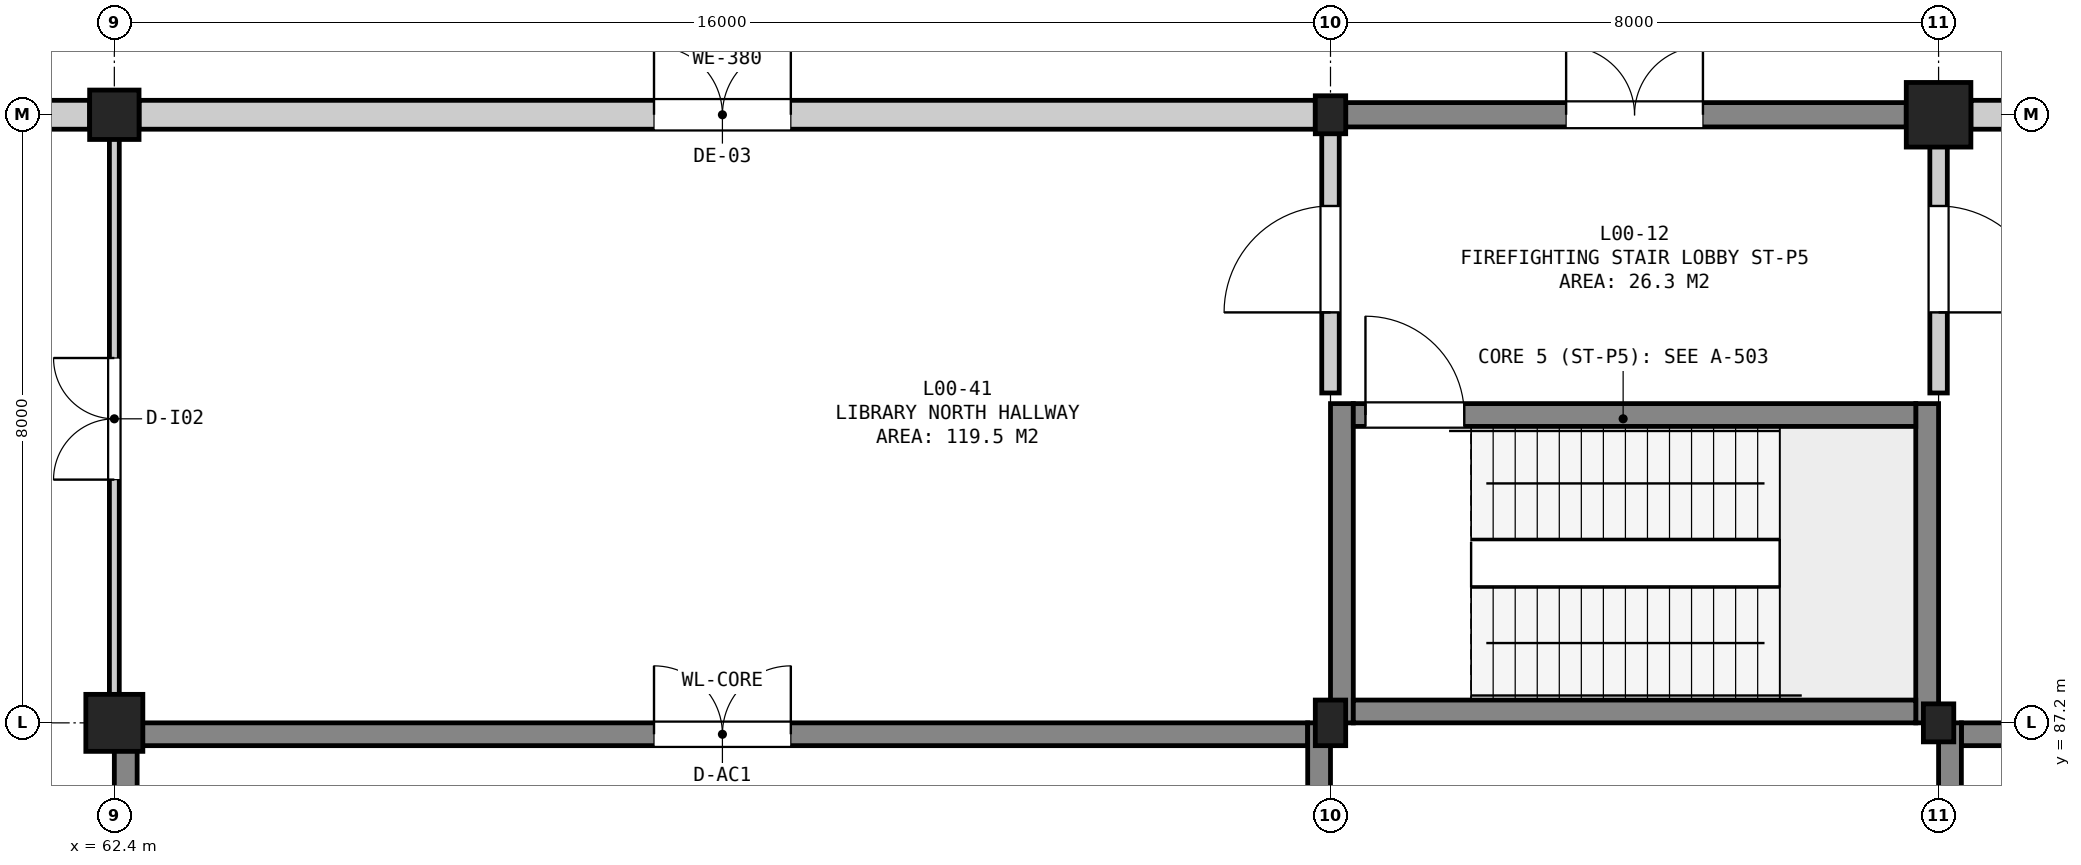
"""IFC4 building model, lengths in metres.
Left out: names, types, materials, properties, quantities, classifications, styles, units other than length and angle.
Written with IfcOpenShell. Run it as: python <this file> out.ifc"""

import sys

from ifc_helpers import new_model, si_unit, direction, frame, frame_2d, origin, origin_2d, place, context, subcontext, project, spatial, rectangle, extrude, element, fill, save


model = new_model("IFC4")
c1 = context("Model", 3, precision=1e-05, world=origin(), true_north=direction((0.0, 1.0)))
c2 = subcontext(c1, "Body", "Model", "MODEL_VIEW")
j1 = project(units=[si_unit("LENGTHUNIT", "METRE"), si_unit("PLANEANGLEUNIT", "RADIAN")], contexts=[c1])
p1 = place(None, origin())
s1 = spatial("IfcSite", under=j1, at=p1, CompositionType="ELEMENT")
p2 = place(p1, origin())
s2 = spatial("IfcBuilding", under=s1, at=p2, CompositionType="ELEMENT")
p3 = place(p2, origin())
s3 = spatial("IfcBuildingStorey", under=s2, at=p3, CompositionType="ELEMENT", Elevation=0.0)
p4 = place(p3, frame((62.4, 87.2, 0.0), z_axis=(0.0, 0.0, 1.0), x_axis=(1.0, 0.0, 0.0)))
e1 = element("IfcColumn", 1, at=p4, inside=s3, PredefinedType="COLUMN", context=c2, shape_type="SweptSolid", body=[
    extrude(rectangle(XDim=0.75, YDim=0.75, at=origin_2d()), origin(), (0.0, 0.0, 1.0), 5.4),
])
p5 = place(p3, frame((62.4, 95.2, 0.0), z_axis=(0.0, 0.0, 1.0), x_axis=(1.0, 0.0, 0.0)))
e2 = element("IfcColumn", 2, at=p5, inside=s3, PredefinedType="COLUMN", context=c2, shape_type="SweptSolid", body=[
    extrude(rectangle(XDim=0.65, YDim=0.65, at=origin_2d()), origin(), (0.0, 0.0, 1.0), 5.4),
])
p6 = place(p3, frame((78.4, 87.2, 0.0), z_axis=(0.0, 0.0, 1.0), x_axis=(1.0, 0.0, 0.0)))
e3 = element("IfcColumn", 3, at=p6, inside=s3, PredefinedType="COLUMN", context=c2, shape_type="SweptSolid", body=[
    extrude(rectangle(XDim=0.4, YDim=0.6, at=origin_2d()), origin(), (0.0, 0.0, 1.0), 5.4),
])
for number, where, z_axis, x_axis in (
    (4, (78.4, 95.2, 0.0), (0.0, 0.0, 1.0), (1.0, 0.0, 0.0)),
    (5, (86.4, 87.2, 0.0), (0.0, 0.0, 1.0), (1.0, 0.0, 0.0)),
):
    element("IfcColumn", number, at=place(p3, frame(where, z_axis=z_axis, x_axis=x_axis)), inside=s3, PredefinedType="COLUMN", context=c2, shape_type="SweptSolid", body=[
        extrude(rectangle(XDim=0.4, YDim=0.5, at=origin_2d()), origin(), (0.0, 0.0, 1.0), 5.4),
    ])
p7 = place(p3, frame((86.4, 95.2, 0.0), z_axis=(0.0, 0.0, 1.0), x_axis=(1.0, 0.0, 0.0)))
e6 = element("IfcColumn", 6, at=p7, inside=s3, PredefinedType="COLUMN", context=c2, shape_type="SweptSolid", body=[
    extrude(rectangle(XDim=0.85, YDim=0.85, at=origin_2d()), origin(), (0.0, 0.0, 1.0), 5.4),
])
p8 = place(p3, frame((102.025, 95.2, 0.0), z_axis=(0.0, 0.0, 1.0), x_axis=(-1.0, 0.0, 0.0)))
e7 = element("IfcWall", 7, at=p8, inside=s3, PredefinedType="SOLIDWALL", context=c2, shape_type="SweptSolid", body=[
    extrude(rectangle(XDim=15.2, YDim=0.38, at=frame_2d((7.6, 0.0))), origin(), (0.0, 0.0, 1.0), 4.065),
])
p9 = place(p8, frame((6.725, 0.0, 0.0)))
e8 = element("IfcOpeningElement", 8, at=p9, cuts=e7, PredefinedType="OPENING", context=c2, shape_type="SweptSolid", body=[
    extrude(rectangle(XDim=1.8, YDim=2.25, at=frame_2d((0.9, 1.125))), frame((0.0, 0.202, 0.0), z_axis=(0.0, -1.0, 0.0), x_axis=(1.0, 0.0, 0.0)), (0.0, 0.0, 1.0), 0.404),
])
p10 = place(p3, frame((85.975, 95.2, 0.0), z_axis=(0.0, 0.0, 1.0), x_axis=(-1.0, 0.0, 0.0)))
e9 = element("IfcWall", 9, at=p10, inside=s3, PredefinedType="SOLIDWALL", context=c2, shape_type="SweptSolid", body=[
    extrude(rectangle(XDim=7.375, YDim=0.32, at=frame_2d((3.688, 0.0))), origin(), (0.0, 0.0, 1.0), 4.515),
])
p11 = place(p10, frame((2.675, 0.0, 0.0)))
e10 = element("IfcOpeningElement", 10, at=p11, cuts=e9, PredefinedType="OPENING", context=c2, shape_type="SweptSolid", body=[
    extrude(rectangle(XDim=1.8, YDim=2.25, at=frame_2d((0.9, 1.125))), frame((0.0, 0.172, 0.0), z_axis=(0.0, -1.0, 0.0), x_axis=(1.0, 0.0, 0.0)), (0.0, 0.0, 1.0), 0.344),
])
p12 = place(p3, frame((78.2, 95.2, 0.0), z_axis=(0.0, 0.0, 1.0), x_axis=(-1.0, 0.0, 0.0)))
e11 = element("IfcWall", 11, at=p12, inside=s3, PredefinedType="SOLIDWALL", context=c2, shape_type="SweptSolid", body=[
    extrude(rectangle(XDim=15.475, YDim=0.38, at=frame_2d((7.737, 0.0))), origin(), (0.0, 0.0, 1.0), 4.015),
])
p13 = place(p12, frame((6.9, 0.0, 0.0)))
e12 = element("IfcOpeningElement", 12, at=p13, cuts=e11, PredefinedType="OPENING", context=c2, shape_type="SweptSolid", body=[
    extrude(rectangle(XDim=1.8, YDim=2.25, at=frame_2d((0.9, 1.125))), frame((0.0, 0.202, 0.0), z_axis=(0.0, -1.0, 0.0), x_axis=(1.0, 0.0, 0.0)), (0.0, 0.0, 1.0), 0.404),
])
p14 = place(p3, frame((62.075, 95.2, 0.0), z_axis=(0.0, 0.0, 1.0), x_axis=(-1.0, 0.0, 0.0)))
e13 = element("IfcWall", 13, at=p14, inside=s3, PredefinedType="SOLIDWALL", context=c2, shape_type="SweptSolid", body=[
    extrude(rectangle(XDim=7.3, YDim=0.38, at=frame_2d((3.65, 0.0))), origin(), (0.0, 0.0, 1.0), 4.48),
])
p15 = place(p14, frame((2.75, 0.0, 0.9)))
e14 = element("IfcOpeningElement", 14, at=p15, cuts=e13, PredefinedType="OPENING", context=c2, shape_type="SweptSolid", body=[
    extrude(rectangle(XDim=1.8, YDim=2.1, at=frame_2d((0.9, 1.05))), frame((0.0, 0.202, 0.0), z_axis=(0.0, -1.0, 0.0), x_axis=(1.0, 0.0, 0.0)), (0.0, 0.0, 1.0), 0.404),
])
p16 = place(p3, frame((62.7, 87.05, 0.0), z_axis=(0.0, 0.0, 1.0), x_axis=(1.0, 0.0, 0.0)))
e15 = element("IfcWall", 15, at=p16, inside=s3, PredefinedType="SHEAR", context=c2, shape_type="SweptSolid", body=[
    extrude(rectangle(XDim=15.4, YDim=0.3, at=frame_2d((7.7, 0.0))), origin(), (0.0, 0.0, 1.0), 5.08),
])
p17 = place(p16, frame((6.8, 0.0, 0.0)))
e16 = element("IfcOpeningElement", 16, at=p17, cuts=e15, PredefinedType="OPENING", context=c2, shape_type="SweptSolid", body=[
    extrude(rectangle(XDim=1.8, YDim=2.3, at=frame_2d((0.9, 1.15))), frame((0.0, 0.162, 0.0), z_axis=(0.0, -1.0, 0.0), x_axis=(1.0, 0.0, 0.0)), (0.0, 0.0, 1.0), 0.324),
])
for number, where, z_axis, x_axis in (
    (17, (62.55, 72.0, 0.0), (0.0, 0.0, 1.0), (0.0, 1.0, 0.0)),
    (18, (78.25, 72.0, 0.0), (0.0, 0.0, 1.0), (0.0, 1.0, 0.0)),
):
    element("IfcWall", number, at=place(p3, frame(where, z_axis=z_axis, x_axis=x_axis)), inside=s3, PredefinedType="SHEAR", context=c2, shape_type="SweptSolid", body=[
        extrude(rectangle(XDim=15.2, YDim=0.3, at=frame_2d((7.6, 0.0))), origin(), (0.0, 0.0, 1.0), 5.08),
    ])
p18 = place(p3, frame((86.7, 87.05, 0.0), z_axis=(0.0, 0.0, 1.0), x_axis=(1.0, 0.0, 0.0)))
e19 = element("IfcWall", 19, at=p18, inside=s3, PredefinedType="SHEAR", context=c2, shape_type="SweptSolid", body=[
    extrude(rectangle(XDim=15.4, YDim=0.3, at=frame_2d((7.7, 0.0))), origin(), (0.0, 0.0, 1.0), 5.08),
])
p19 = place(p3, frame((86.55, 72.0, 0.0), z_axis=(0.0, 0.0, 1.0), x_axis=(0.0, 1.0, 0.0)))
e20 = element("IfcWall", 20, at=p19, inside=s3, PredefinedType="SHEAR", context=c2, shape_type="SweptSolid", body=[
    extrude(rectangle(XDim=15.2, YDim=0.3, at=frame_2d((7.6, 0.0))), origin(), (0.0, 0.0, 1.0), 5.08),
])
for number, where, z_axis, x_axis in (
    (21, (78.55, 87.2, 0.0), (0.0, 0.0, 1.0), (0.0, 1.0, 0.0)),
    (22, (86.25, 87.2, 0.0), (0.0, 0.0, 1.0), (0.0, 1.0, 0.0)),
):
    element("IfcWall", number, at=place(p3, frame(where, z_axis=z_axis, x_axis=x_axis)), inside=s3, PredefinedType="SHEAR", context=c2, shape_type="SweptSolid", body=[
        extrude(rectangle(XDim=4.2, YDim=0.3, at=frame_2d((2.1, 0.0))), origin(), (0.0, 0.0, 1.0), 5.08),
    ])
p20 = place(p3, frame((78.7, 87.35, 0.0), z_axis=(0.0, 0.0, 1.0), x_axis=(1.0, 0.0, 0.0)))
e23 = element("IfcWall", 23, at=p20, inside=s3, PredefinedType="SHEAR", context=c2, shape_type="SweptSolid", body=[
    extrude(rectangle(XDim=7.4, YDim=0.3, at=frame_2d((3.7, 0.0))), origin(), (0.0, 0.0, 1.0), 5.08),
])
p21 = place(p3, frame((78.7, 91.25, 0.0), z_axis=(0.0, 0.0, 1.0), x_axis=(1.0, 0.0, 0.0)))
e24 = element("IfcWall", 24, at=p21, inside=s3, PredefinedType="SHEAR", context=c2, shape_type="SweptSolid", body=[
    extrude(rectangle(XDim=7.4, YDim=0.3, at=frame_2d((3.7, 0.0))), origin(), (0.0, 0.0, 1.0), 5.08),
])
p22 = place(p21, frame((0.16, 0.0, 0.0)))
e25 = element("IfcOpeningElement", 25, at=p22, cuts=e24, PredefinedType="OPENING", context=c2, shape_type="SweptSolid", body=[
    extrude(rectangle(XDim=1.3, YDim=2.18, at=frame_2d((0.65, 1.09))), frame((0.0, 0.162, 0.0), z_axis=(0.0, -1.0, 0.0), x_axis=(1.0, 0.0, 0.0)), (0.0, 0.0, 1.0), 0.324),
])
p23 = place(p3, frame((78.4, 91.54, 0.0), z_axis=(0.0, 0.0, 1.0), x_axis=(0.0, 1.0, 0.0)))
e26 = element("IfcWall", 26, at=p23, inside=s3, PredefinedType="SOLIDWALL", context=c2, shape_type="SweptSolid", body=[
    extrude(rectangle(XDim=3.455, YDim=0.23, at=frame_2d((1.728, 0.0))), origin(), (0.0, 0.0, 1.0), 4.425),
])
p24 = place(p23, frame((1.06, 0.0, 0.0)))
e27 = element("IfcOpeningElement", 27, at=p24, cuts=e26, PredefinedType="OPENING", context=c2, shape_type="SweptSolid", body=[
    extrude(rectangle(XDim=1.4, YDim=2.2, at=frame_2d((0.7, 1.1))), frame((0.0, 0.127, 0.0), z_axis=(0.0, -1.0, 0.0), x_axis=(1.0, 0.0, 0.0)), (0.0, 0.0, 1.0), 0.254),
])
p25 = place(p3, frame((86.4, 91.54, 0.0), z_axis=(0.0, 0.0, 1.0), x_axis=(0.0, 1.0, 0.0)))
e28 = element("IfcWall", 28, at=p25, inside=s3, PredefinedType="SOLIDWALL", context=c2, shape_type="SweptSolid", body=[
    extrude(rectangle(XDim=3.555, YDim=0.23, at=frame_2d((1.777, 0.0))), origin(), (0.0, 0.0, 1.0), 4.225),
])
p26 = place(p25, frame((1.06, 0.0, 0.0)))
e29 = element("IfcOpeningElement", 29, at=p26, cuts=e28, PredefinedType="OPENING", context=c2, shape_type="SweptSolid", body=[
    extrude(rectangle(XDim=1.4, YDim=2.2, at=frame_2d((0.7, 1.1))), frame((0.0, 0.127, 0.0), z_axis=(0.0, -1.0, 0.0), x_axis=(1.0, 0.0, 0.0)), (0.0, 0.0, 1.0), 0.254),
])
p27 = place(p3, frame((62.4, 87.34, 0.0), z_axis=(0.0, 0.0, 1.0), x_axis=(0.0, 1.0, 0.0)))
e30 = element("IfcWall", 30, at=p27, inside=s3, PredefinedType="PARTITIONING", context=c2, shape_type="SweptSolid", body=[
    extrude(rectangle(XDim=7.655, YDim=0.13, at=frame_2d((3.828, 0.0))), origin(), (0.0, 0.0, 1.0), 4.575),
])
p28 = place(p27, frame((3.06, 0.0, 0.0)))
e31 = element("IfcOpeningElement", 31, at=p28, cuts=e30, PredefinedType="OPENING", context=c2, shape_type="SweptSolid", body=[
    extrude(rectangle(XDim=1.6, YDim=2.2, at=frame_2d((0.8, 1.1))), frame((0.0, 0.077, 0.0), z_axis=(0.0, -1.0, 0.0), x_axis=(1.0, 0.0, 0.0)), (0.0, 0.0, 1.0), 0.154),
])
p29 = place(p11, frame((1.8, 0.0, 0.0), z_axis=(0.0, 0.0, 1.0), x_axis=(-1.0, 0.0, 0.0)))
e32 = element("IfcDoor", 32, at=p29, inside=s3, OperationType="DOUBLE_DOOR_SINGLE_SWING", PredefinedType="DOOR", context=c2, shape_type="SweptSolid", body=[
    extrude(rectangle(XDim=1.8, YDim=2.25, at=frame_2d((0.9, 1.125))), frame((0.0, 0.025, 0.0), z_axis=(0.0, -1.0, 0.0), x_axis=(1.0, 0.0, 0.0)), (0.0, 0.0, 1.0), 0.05),
])
fill(e10, e32)
p30 = place(p13, frame((1.8, 0.0, 0.0), z_axis=(0.0, 0.0, 1.0), x_axis=(-1.0, 0.0, 0.0)))
e33 = element("IfcDoor", 33, at=p30, inside=s3, OperationType="DOUBLE_DOOR_SINGLE_SWING", PredefinedType="DOOR", context=c2, shape_type="SweptSolid", body=[
    extrude(rectangle(XDim=1.8, YDim=2.25, at=frame_2d((0.9, 1.125))), frame((0.0, 0.025, 0.0), z_axis=(0.0, -1.0, 0.0), x_axis=(1.0, 0.0, 0.0)), (0.0, 0.0, 1.0), 0.05),
])
fill(e12, e33)
p31 = place(p17, origin())
e34 = element("IfcDoor", 34, at=p31, inside=s3, OperationType="DOUBLE_DOOR_SINGLE_SWING", PredefinedType="DOOR", context=c2, shape_type="SweptSolid", body=[
    extrude(rectangle(XDim=1.8, YDim=2.3, at=frame_2d((0.9, 1.15))), frame((0.0, 0.025, 0.0), z_axis=(0.0, -1.0, 0.0), x_axis=(1.0, 0.0, 0.0)), (0.0, 0.0, 1.0), 0.05),
])
fill(e16, e34)
p32 = place(p22, origin())
e35 = element("IfcDoor", 35, at=p32, inside=s3, OperationType="SINGLE_SWING_LEFT", PredefinedType="DOOR", context=c2, shape_type="SweptSolid", body=[
    extrude(rectangle(XDim=1.3, YDim=2.18, at=frame_2d((0.65, 1.09))), frame((0.0, 0.025, 0.0), z_axis=(0.0, -1.0, 0.0), x_axis=(1.0, 0.0, 0.0)), (0.0, 0.0, 1.0), 0.05),
])
fill(e25, e35)
p33 = place(p24, origin())
e36 = element("IfcDoor", 36, at=p33, inside=s3, OperationType="SINGLE_SWING_LEFT", PredefinedType="DOOR", context=c2, shape_type="SweptSolid", body=[
    extrude(rectangle(XDim=1.4, YDim=2.2, at=frame_2d((0.7, 1.1))), frame((0.0, 0.025, 0.0), z_axis=(0.0, -1.0, 0.0), x_axis=(1.0, 0.0, 0.0)), (0.0, 0.0, 1.0), 0.05),
])
fill(e27, e36)
p34 = place(p26, frame((1.4, 0.0, 0.0), z_axis=(0.0, 0.0, 1.0), x_axis=(-1.0, 0.0, 0.0)))
e37 = element("IfcDoor", 37, at=p34, inside=s3, OperationType="SINGLE_SWING_RIGHT", PredefinedType="DOOR", context=c2, shape_type="SweptSolid", body=[
    extrude(rectangle(XDim=1.4, YDim=2.2, at=frame_2d((0.7, 1.1))), frame((0.0, 0.025, 0.0), z_axis=(0.0, -1.0, 0.0), x_axis=(1.0, 0.0, 0.0)), (0.0, 0.0, 1.0), 0.05),
])
fill(e29, e37)
p35 = place(p28, origin())
e38 = element("IfcDoor", 38, at=p35, inside=s3, OperationType="DOUBLE_DOOR_SINGLE_SWING", PredefinedType="DOOR", context=c2, shape_type="SweptSolid", body=[
    extrude(rectangle(XDim=1.6, YDim=2.2, at=frame_2d((0.8, 1.1))), frame((0.0, 0.025, 0.0), z_axis=(0.0, -1.0, 0.0), x_axis=(1.0, 0.0, 0.0)), (0.0, 0.0, 1.0), 0.05),
])
fill(e31, e38)
save(model, sys.argv[1])
